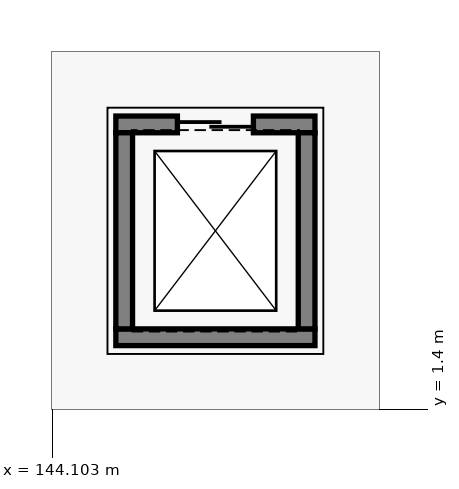
"""IFC4 building model, lengths in metres.
Left out: names, types, materials, properties, quantities, classifications, styles, units other than length and angle.
Written with IfcOpenShell. Run it as: python <this file> out.ifc"""

import sys

from ifc_helpers import new_model, si_unit, direction, frame, frame_2d, origin, place, context, subcontext, project, spatial, rectangle, extrude, element, fill, save


model = new_model("IFC4")
c1 = context("Model", 3, precision=1e-05, world=origin(), true_north=direction((0.0, 1.0)))
c2 = subcontext(c1, "Body", "Model", "MODEL_VIEW")
j1 = project(units=[si_unit("LENGTHUNIT", "METRE"), si_unit("PLANEANGLEUNIT", "RADIAN")], contexts=[c1])
p1 = place(None, origin())
s1 = spatial("IfcSite", under=j1, at=p1, CompositionType="ELEMENT")
p2 = place(p1, origin())
s2 = spatial("IfcBuilding", under=s1, at=p2, CompositionType="ELEMENT")
p3 = place(p2, origin())
s3 = spatial("IfcBuildingStorey", under=s2, at=p3, CompositionType="ELEMENT", Elevation=0.0)
p4 = place(p3, frame((144.94, 2.35, 0.0), z_axis=(0.0, 0.0, 1.0), x_axis=(1.0, 0.0, 0.0)))
e1 = element("IfcWall", 1, at=p4, inside=s3, PredefinedType="SOLIDWALL", context=c2, shape_type="SweptSolid", body=[
    extrude(rectangle(XDim=2.62, YDim=0.22, at=frame_2d((1.31, 0.0))), origin(), (0.0, 0.0, 1.0), 4.5),
])
p5 = place(p3, frame((144.94, 5.15, 0.0), z_axis=(0.0, 0.0, 1.0), x_axis=(1.0, 0.0, 0.0)))
e2 = element("IfcWall", 2, at=p5, inside=s3, PredefinedType="SOLIDWALL", context=c2, shape_type="SweptSolid", body=[
    extrude(rectangle(XDim=2.62, YDim=0.22, at=frame_2d((1.31, 0.0))), origin(), (0.0, 0.0, 1.0), 4.5),
])
p6 = place(p5, frame((0.81, 0.0, 0.0)))
e3 = element("IfcOpeningElement", 3, at=p6, cuts=e2, PredefinedType="OPENING", context=c2, shape_type="SweptSolid", body=[
    extrude(rectangle(XDim=1.0, YDim=2.15, at=frame_2d((0.5, 1.075))), frame((0.0, 0.12, 0.0), z_axis=(0.0, -1.0, 0.0), x_axis=(1.0, 0.0, 0.0)), (0.0, 0.0, 1.0), 0.24),
])
for number, where, z_axis, x_axis in (
    (4, (145.05, 2.46, 0.0), (0.0, 0.0, 1.0), (0.0, 1.0, 0.0)),
    (5, (147.45, 2.46, 0.0), (0.0, 0.0, 1.0), (0.0, 1.0, 0.0)),
):
    element("IfcWall", number, at=place(p3, frame(where, z_axis=z_axis, x_axis=x_axis)), inside=s3, PredefinedType="SOLIDWALL", context=c2, shape_type="SweptSolid", body=[
        extrude(rectangle(XDim=2.58, YDim=0.22, at=frame_2d((1.29, 0.0))), origin(), (0.0, 0.0, 1.0), 4.5),
    ])
p7 = place(p6, origin())
e6 = element("IfcDoor", 6, at=p7, inside=s3, OperationType="SLIDING_TO_LEFT", PredefinedType="DOOR", context=c2, shape_type="SweptSolid", body=[
    extrude(rectangle(XDim=1.0, YDim=2.15, at=frame_2d((0.5, 1.075))), frame((0.0, 0.025, 0.0), z_axis=(0.0, -1.0, 0.0), x_axis=(1.0, 0.0, 0.0)), (0.0, 0.0, 1.0), 0.05),
])
fill(e3, e6)
save(model, sys.argv[1])
